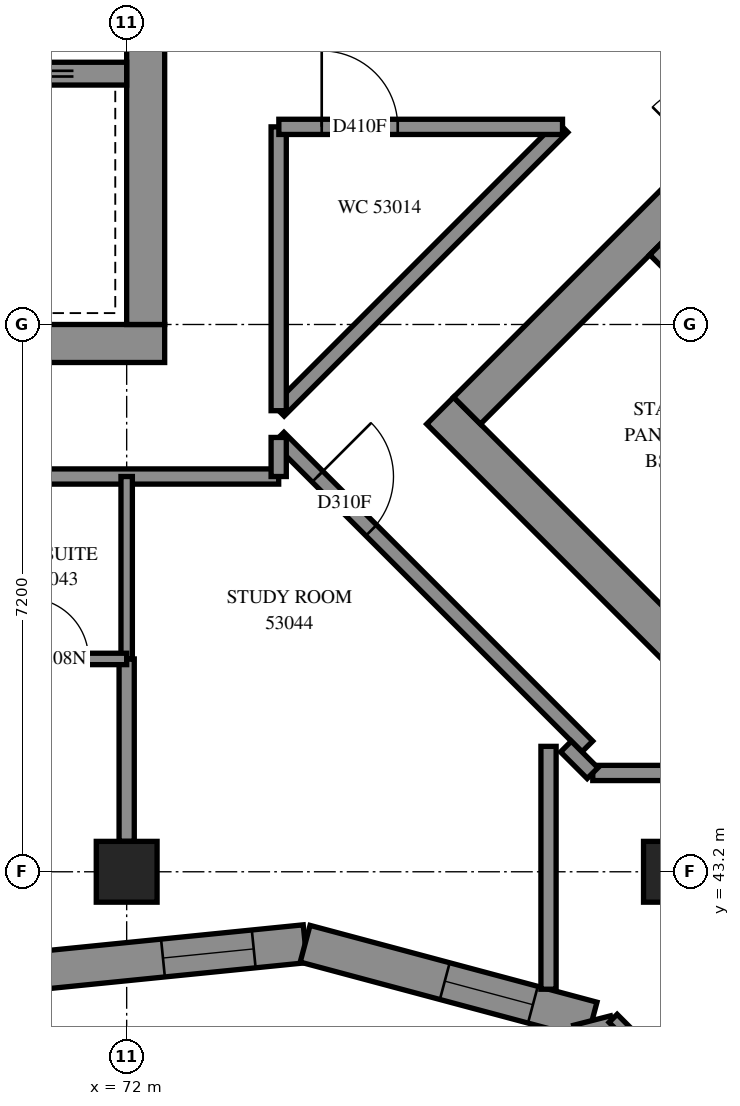
"""IFC4 building model, lengths in metres.
Left out: names, types, materials, properties, quantities, classifications, styles, units other than length and angle.
Written with IfcOpenShell. Run it as: python <this file> out.ifc"""

import sys

from ifc_helpers import new_model, si_unit, direction, frame, frame_2d, origin, origin_2d, place, context, subcontext, project, spatial, polyline, rectangle, outline, extrude, element, fill, save


model = new_model("IFC4")
c1 = context("Model", 3, precision=1e-05, world=origin(), true_north=direction((0.0, 1.0)))
c2 = subcontext(c1, "Body", "Model", "MODEL_VIEW")
j1 = project(units=[si_unit("LENGTHUNIT", "METRE"), si_unit("PLANEANGLEUNIT", "RADIAN")], contexts=[c1])
p1 = place(None, origin())
s1 = spatial("IfcSite", under=j1, at=p1, CompositionType="ELEMENT")
p2 = place(p1, origin())
s2 = spatial("IfcBuilding", under=s1, at=p2, CompositionType="ELEMENT")
p3 = place(p2, frame((0.0, 0.0, 196.4)))
s3 = spatial("IfcBuildingStorey", under=s2, at=p3, CompositionType="ELEMENT", Elevation=196.4)
for number, where, z_axis, x_axis in (
    (1, (72.0, 43.2, 0.0), (0.0, 0.0, 1.0), (1.0, 0.0, 0.0)),
    (2, (79.2, 43.2, 0.0), (0.0, 0.0, 1.0), (1.0, 0.0, 0.0)),
):
    element("IfcColumn", number, at=place(p3, frame(where, z_axis=z_axis, x_axis=x_axis)), inside=s3, PredefinedType="COLUMN", context=c2, shape_type="SweptSolid", body=[
        extrude(rectangle(XDim=0.8, YDim=0.8, at=origin_2d()), origin(), (0.0, 0.0, 1.0), 3.1),
    ])
p4 = place(p3, frame((57.1, 50.15, -0.3), z_axis=(0.0, 0.0, 1.0), x_axis=(1.0, 0.0, 0.0)))
e3 = element("IfcWall", 3, at=p4, inside=s3, PredefinedType="SHEAR", context=c2, shape_type="SweptSolid", body=[
    extrude(rectangle(XDim=15.4, YDim=0.5, at=frame_2d((7.7, 0.0))), origin(), (0.0, 0.0, 1.0), 2.7),
])
p5 = place(p3, frame((72.25, 50.4, -0.3), z_axis=(0.0, 0.0, 1.0), x_axis=(0.0, 1.0, 0.0)))
e4 = element("IfcWall", 4, at=p5, inside=s3, PredefinedType="SHEAR", context=c2, shape_type="SweptSolid", body=[
    extrude(rectangle(XDim=14.4, YDim=0.5, at=frame_2d((7.2, 0.0))), origin(), (0.0, 0.0, 1.0), 2.7),
])
p6 = place(p5, frame((4.55, 0.0, 0.3)))
e5 = element("IfcOpeningElement", 5, at=p6, cuts=e4, PredefinedType="OPENING", context=c2, shape_type="SweptSolid", body=[
    extrude(rectangle(XDim=1.1, YDim=2.1, at=frame_2d((0.55, 1.05))), frame((0.0, 0.26, 0.0), z_axis=(0.0, -1.0, 0.0), x_axis=(1.0, 0.0, 0.0)), (0.0, 0.0, 1.0), 0.52),
])
p7 = place(p5, frame((11.35, 0.0, 0.3)))
e6 = element("IfcOpeningElement", 6, at=p7, cuts=e4, PredefinedType="OPENING", context=c2, shape_type="SweptSolid", body=[
    extrude(rectangle(XDim=1.1, YDim=2.1, at=frame_2d((0.55, 1.05))), frame((0.0, 0.26, 0.0), z_axis=(0.0, -1.0, 0.0), x_axis=(1.0, 0.0, 0.0)), (0.0, 0.0, 1.0), 0.52),
])
p8 = place(p3, frame((57.6, 53.7, 0.0), z_axis=(0.0, 0.0, 1.0), x_axis=(1.0, 0.0, 0.0)))
e7 = element("IfcWall", 7, at=p8, inside=s3, PredefinedType="SOLIDWALL", context=c2, shape_type="SweptSolid", body=[
    extrude(rectangle(XDim=14.4, YDim=0.3, at=frame_2d((7.2, 0.0))), origin(), (0.0, 0.0, 1.0), 3.1),
])
p9 = place(p8, frame((1.35, 0.0, 0.0)))
e8 = element("IfcOpeningElement", 8, at=p9, cuts=e7, PredefinedType="OPENING", context=c2, shape_type="SweptSolid", body=[
    extrude(rectangle(XDim=0.9, YDim=2.1, at=frame_2d((0.45, 1.05))), frame((0.0, 0.16, 0.0), z_axis=(0.0, -1.0, 0.0), x_axis=(1.0, 0.0, 0.0)), (0.0, 0.0, 1.0), 0.32),
])
p10 = place(p8, frame((4.95, 0.0, 0.0)))
e9 = element("IfcOpeningElement", 9, at=p10, cuts=e7, PredefinedType="OPENING", context=c2, shape_type="SweptSolid", body=[
    extrude(rectangle(XDim=0.9, YDim=2.1, at=frame_2d((0.45, 1.05))), frame((0.0, 0.16, 0.0), z_axis=(0.0, -1.0, 0.0), x_axis=(1.0, 0.0, 0.0)), (0.0, 0.0, 1.0), 0.32),
])
p11 = place(p8, frame((8.55, 0.0, 0.0)))
e10 = element("IfcOpeningElement", 10, at=p11, cuts=e7, PredefinedType="OPENING", context=c2, shape_type="SweptSolid", body=[
    extrude(rectangle(XDim=0.9, YDim=2.1, at=frame_2d((0.45, 1.05))), frame((0.0, 0.16, 0.0), z_axis=(0.0, -1.0, 0.0), x_axis=(1.0, 0.0, 0.0)), (0.0, 0.0, 1.0), 0.32),
])
p12 = place(p8, frame((12.05, 0.0, 0.0)))
e11 = element("IfcOpeningElement", 11, at=p12, cuts=e7, PredefinedType="OPENING", context=c2, shape_type="SweptSolid", body=[
    extrude(rectangle(XDim=1.1, YDim=2.1, at=frame_2d((0.55, 1.05))), frame((0.0, 0.16, 0.0), z_axis=(0.0, -1.0, 0.0), x_axis=(1.0, 0.0, 0.0)), (0.0, 0.0, 1.0), 0.32),
])
p13 = place(p3, frame((76.124, 49.267, -0.3), z_axis=(0.0, 0.0, 1.0), x_axis=(0.7071067812, -0.7071067812, 0.0)))
e12 = element("IfcWall", 12, at=p13, inside=s3, PredefinedType="SHEAR", context=c2, shape_type="SweptSolid", body=[
    extrude(rectangle(XDim=15.4, YDim=0.5, at=frame_2d((7.7, 0.0))), origin(), (0.0, 0.0, 1.0), 2.7),
])
p14 = place(p3, frame((76.478, 49.267, -0.3), z_axis=(0.0, 0.0, 1.0), x_axis=(0.7071067812, 0.7071067812, 0.0)))
e13 = element("IfcWall", 13, at=p14, inside=s3, PredefinedType="SHEAR", context=c2, shape_type="SweptSolid", body=[
    extrude(rectangle(XDim=14.4, YDim=0.5, at=frame_2d((7.2, 0.0))), origin(), (0.0, 0.0, 1.0), 2.7),
])
p15 = place(p14, frame((4.55, 0.0, 0.3)))
e14 = element("IfcOpeningElement", 14, at=p15, cuts=e13, PredefinedType="OPENING", context=c2, shape_type="SweptSolid", body=[
    extrude(rectangle(XDim=1.1, YDim=2.1, at=frame_2d((0.55, 1.05))), frame((0.0, 0.26, 0.0), z_axis=(0.0, -1.0, 0.0), x_axis=(1.0, 0.0, 0.0)), (0.0, 0.0, 1.0), 0.52),
])
p16 = place(p14, frame((11.35, 0.0, 0.3)))
e15 = element("IfcOpeningElement", 15, at=p16, cuts=e13, PredefinedType="OPENING", context=c2, shape_type="SweptSolid", body=[
    extrude(rectangle(XDim=1.1, YDim=2.1, at=frame_2d((0.55, 1.05))), frame((0.0, 0.26, 0.0), z_axis=(0.0, -1.0, 0.0), x_axis=(1.0, 0.0, 0.0)), (0.0, 0.0, 1.0), 0.52),
])
p17 = place(p3, frame((78.988, 51.423, 0.0), z_axis=(0.0, 0.0, 1.0), x_axis=(0.7071067812, -0.7071067812, 0.0)))
e16 = element("IfcWall", 16, at=p17, inside=s3, PredefinedType="SOLIDWALL", context=c2, shape_type="SweptSolid", body=[
    extrude(rectangle(XDim=14.4, YDim=0.3, at=frame_2d((7.2, 0.0))), origin(), (0.0, 0.0, 1.0), 3.1),
])
p18 = place(p17, frame((1.35, 0.0, 0.0)))
e17 = element("IfcOpeningElement", 17, at=p18, cuts=e16, PredefinedType="OPENING", context=c2, shape_type="SweptSolid", body=[
    extrude(rectangle(XDim=0.9, YDim=2.1, at=frame_2d((0.45, 1.05))), frame((0.0, 0.16, 0.0), z_axis=(0.0, -1.0, 0.0), x_axis=(1.0, 0.0, 0.0)), (0.0, 0.0, 1.0), 0.32),
])
p19 = place(p17, frame((4.95, 0.0, 0.0)))
e18 = element("IfcOpeningElement", 18, at=p19, cuts=e16, PredefinedType="OPENING", context=c2, shape_type="SweptSolid", body=[
    extrude(rectangle(XDim=0.9, YDim=2.1, at=frame_2d((0.45, 1.05))), frame((0.0, 0.16, 0.0), z_axis=(0.0, -1.0, 0.0), x_axis=(1.0, 0.0, 0.0)), (0.0, 0.0, 1.0), 0.32),
])
p20 = place(p17, frame((8.55, 0.0, 0.0)))
e19 = element("IfcOpeningElement", 19, at=p20, cuts=e16, PredefinedType="OPENING", context=c2, shape_type="SweptSolid", body=[
    extrude(rectangle(XDim=0.9, YDim=2.1, at=frame_2d((0.45, 1.05))), frame((0.0, 0.16, 0.0), z_axis=(0.0, -1.0, 0.0), x_axis=(1.0, 0.0, 0.0)), (0.0, 0.0, 1.0), 0.32),
])
p21 = place(p17, frame((12.05, 0.0, 0.0)))
e20 = element("IfcOpeningElement", 20, at=p21, cuts=e16, PredefinedType="OPENING", context=c2, shape_type="SweptSolid", body=[
    extrude(rectangle(XDim=1.1, YDim=2.1, at=frame_2d((0.55, 1.05))), frame((0.0, 0.16, 0.0), z_axis=(0.0, -1.0, 0.0), x_axis=(1.0, 0.0, 0.0)), (0.0, 0.0, 1.0), 0.32),
])
p22 = place(p3, frame((70.738, 41.89, 0.0), z_axis=(0.0, 0.0, 1.0), x_axis=(0.9949827385, 0.1000467394, 0.0)))
e21 = element("IfcWall", 21, at=p22, inside=s3, PredefinedType="SOLIDWALL", context=c2, shape_type="SweptSolid", body=[
    extrude(outline(polyline([(-0.025, -0.25), (3.583, -0.25), (3.674, 0.25), (0.025, 0.25), (-0.025, -0.25)])), origin(), (0.0, 0.0, 1.0), 3.1),
])
p23 = place(p22, frame((1.748, 0.0, 0.45)))
e22 = element("IfcOpeningElement", 22, at=p23, cuts=e21, PredefinedType="OPENING", context=c2, shape_type="SweptSolid", body=[
    extrude(rectangle(XDim=1.2, YDim=2.5, at=frame_2d((0.6, 1.25))), frame((0.0, 0.26, 0.0), z_axis=(0.0, -1.0, 0.0), x_axis=(1.0, 0.0, 0.0)), (0.0, 0.0, 1.0), 0.52),
])
p24 = place(p3, frame((74.348, 42.253, 0.0), z_axis=(0.0, 0.0, 1.0), x_axis=(0.9659839018, -0.2586022069, 0.0)))
e23 = element("IfcWall", 23, at=p24, inside=s3, PredefinedType="SOLIDWALL", context=c2, shape_type="SweptSolid", body=[
    extrude(outline(polyline([(0.046, -0.25), (3.762, -0.25), (4.054, 0.25), (-0.046, 0.25), (0.046, -0.25)])), origin(), (0.0, 0.0, 1.0), 3.1),
])
p25 = place(p24, frame((1.902, 0.0, 0.45)))
e24 = element("IfcOpeningElement", 24, at=p25, cuts=e23, PredefinedType="OPENING", context=c2, shape_type="SweptSolid", body=[
    extrude(rectangle(XDim=1.2, YDim=2.5, at=frame_2d((0.6, 1.25))), frame((0.0, 0.26, 0.0), z_axis=(0.0, -1.0, 0.0), x_axis=(1.0, 0.0, 0.0)), (0.0, 0.0, 1.0), 0.52),
])
p26 = place(p3, frame((78.123, 41.243, 0.0), z_axis=(0.0, 0.0, 1.0), x_axis=(0.2482151311, -0.9687049338, 0.0)))
e25 = element("IfcWall", 25, at=p26, inside=s3, PredefinedType="SOLIDWALL", context=c2, shape_type="SweptSolid", body=[
    extrude(outline(polyline([(0.146, -0.25), (4.857, -0.25), (4.574, 0.25), (-0.146, 0.25), (0.146, -0.25)])), origin(), (0.0, 0.0, 1.0), 3.1),
])
p27 = place(p26, frame((2.135, 0.0, 0.45)))
e26 = element("IfcOpeningElement", 26, at=p27, cuts=e25, PredefinedType="OPENING", context=c2, shape_type="SweptSolid", body=[
    extrude(rectangle(XDim=1.2, YDim=2.5, at=frame_2d((0.6, 1.25))), frame((0.0, 0.26, 0.0), z_axis=(0.0, -1.0, 0.0), x_axis=(1.0, 0.0, 0.0)), (0.0, 0.0, 1.0), 0.52),
])
p28 = place(p26, frame((0.305, 0.0, 0.45)))
e27 = element("IfcOpeningElement", 27, at=p28, cuts=e25, PredefinedType="OPENING", context=c2, shape_type="SweptSolid", body=[
    extrude(rectangle(XDim=0.8, YDim=2.5, at=frame_2d((0.4, 1.25))), frame((0.0, 0.26, 0.0), z_axis=(0.0, -1.0, 0.0), x_axis=(1.0, 0.0, 0.0)), (0.0, 0.0, 1.0), 0.52),
])
p29 = place(p3, frame((55.6, 48.4, 0.0), z_axis=(0.0, 0.0, 1.0), x_axis=(1.0, 0.0, 0.0)))
e28 = element("IfcWall", 28, at=p29, inside=s3, PredefinedType="PARTITIONING", context=c2, shape_type="SweptSolid", body=[
    extrude(rectangle(XDim=18.4, YDim=0.2, at=frame_2d((9.2, 0.0))), origin(), (0.0, 0.0, 1.0), 3.1),
])
p30 = place(p29, frame((5.862, 0.0, 0.0)))
e29 = element("IfcOpeningElement", 29, at=p30, cuts=e28, PredefinedType="OPENING", context=c2, shape_type="SweptSolid", body=[
    extrude(rectangle(XDim=1.0, YDim=2.1, at=frame_2d((0.5, 1.05))), frame((0.0, 0.11, 0.0), z_axis=(0.0, -1.0, 0.0), x_axis=(1.0, 0.0, 0.0)), (0.0, 0.0, 1.0), 0.22),
])
p31 = place(p29, frame((11.5, 0.0, 0.0)))
e30 = element("IfcOpeningElement", 30, at=p31, cuts=e28, PredefinedType="OPENING", context=c2, shape_type="SweptSolid", body=[
    extrude(rectangle(XDim=0.9, YDim=2.1, at=frame_2d((0.45, 1.05))), frame((0.0, 0.11, 0.0), z_axis=(0.0, -1.0, 0.0), x_axis=(1.0, 0.0, 0.0)), (0.0, 0.0, 1.0), 0.22),
])
p32 = place(p29, frame((13.2, 0.0, 0.0)))
e31 = element("IfcOpeningElement", 31, at=p32, cuts=e28, PredefinedType="OPENING", context=c2, shape_type="SweptSolid", body=[
    extrude(rectangle(XDim=0.9, YDim=2.1, at=frame_2d((0.45, 1.05))), frame((0.0, 0.11, 0.0), z_axis=(0.0, -1.0, 0.0), x_axis=(1.0, 0.0, 0.0)), (0.0, 0.0, 1.0), 0.22),
])
p33 = place(p3, frame((73.999, 48.911, 0.0), z_axis=(0.0, 0.0, 1.0), x_axis=(0.7071067812, -0.7071067812, 0.0)))
e32 = element("IfcWall", 32, at=p33, inside=s3, PredefinedType="PARTITIONING", context=c2, shape_type="SweptSolid", body=[
    extrude(rectangle(XDim=5.745, YDim=0.2, at=frame_2d((2.872, 0.0))), origin(), (0.0, 0.0, 1.0), 3.1),
])
p34 = place(p33, frame((0.724, 0.0, 0.0)))
e33 = element("IfcOpeningElement", 33, at=p34, cuts=e32, PredefinedType="OPENING", context=c2, shape_type="SweptSolid", body=[
    extrude(rectangle(XDim=1.0, YDim=2.1, at=frame_2d((0.5, 1.05))), frame((0.0, 0.11, 0.0), z_axis=(0.0, -1.0, 0.0), x_axis=(1.0, 0.0, 0.0)), (0.0, 0.0, 1.0), 0.22),
])
p35 = place(p3, frame((74.001, 49.267, 0.0), z_axis=(0.0, 0.0, 1.0), x_axis=(0.7071067812, 0.7071067812, 0.0)))
e34 = element("IfcWall", 34, at=p35, inside=s3, PredefinedType="PARTITIONING", context=c2, shape_type="SweptSolid", body=[
    extrude(rectangle(XDim=5.278, YDim=0.2, at=frame_2d((2.639, 0.0))), origin(), (0.0, 0.0, 1.0), 3.1),
])
p36 = place(p3, frame((74.0, 49.266, 0.0), z_axis=(0.0, 0.0, 1.0), x_axis=(0.0, 1.0, 0.0)))
e35 = element("IfcWall", 35, at=p36, inside=s3, PredefinedType="PARTITIONING", context=c2, shape_type="SweptSolid", body=[
    extrude(rectangle(XDim=3.734, YDim=0.2, at=frame_2d((1.867, 0.0))), origin(), (0.0, 0.0, 1.0), 3.1),
])
p37 = place(p3, frame((74.002, 53.0, 0.0), z_axis=(0.0, 0.0, 1.0), x_axis=(1.0, 0.0, 0.0)))
e36 = element("IfcWall", 36, at=p37, inside=s3, PredefinedType="PARTITIONING", context=c2, shape_type="SweptSolid", body=[
    extrude(rectangle(XDim=3.732, YDim=0.2, at=frame_2d((1.866, 0.0))), origin(), (0.0, 0.0, 1.0), 3.1),
])
p38 = place(p37, frame((0.564, 0.0, 0.0)))
e37 = element("IfcOpeningElement", 37, at=p38, cuts=e36, PredefinedType="OPENING", context=c2, shape_type="SweptSolid", body=[
    extrude(rectangle(XDim=1.0, YDim=2.1, at=frame_2d((0.5, 1.05))), frame((0.0, 0.11, 0.0), z_axis=(0.0, -1.0, 0.0), x_axis=(1.0, 0.0, 0.0)), (0.0, 0.0, 1.0), 0.22),
])
p39 = place(p3, frame((77.55, 41.655, 0.0), z_axis=(0.0, 0.0, 1.0), x_axis=(0.0, 1.0, 0.0)))
e38 = element("IfcWall", 38, at=p39, inside=s3, PredefinedType="PARTITIONING", context=c2, shape_type="SweptSolid", body=[
    extrude(rectangle(XDim=3.195, YDim=0.2, at=frame_2d((1.598, 0.0))), origin(), (0.0, 0.0, 1.0), 3.1),
])
p40 = place(p3, frame((78.4, 41.272, 0.0), z_axis=(0.0, 0.0, 1.0), x_axis=(0.7065959276, -0.707617266, 0.0)))
e39 = element("IfcWall", 39, at=p40, inside=s3, PredefinedType="PARTITIONING", context=c2, shape_type="SweptSolid", body=[
    extrude(rectangle(XDim=2.937, YDim=0.15, at=frame_2d((1.469, 0.0))), origin(), (0.0, 0.0, 1.0), 3.1),
])
p41 = place(p3, frame((72.0, 43.6, 0.0), z_axis=(0.0, 0.0, 1.0), x_axis=(0.0, 1.0, 0.0)))
e40 = element("IfcWall", 40, at=p41, inside=s3, PredefinedType="PARTITIONING", context=c2, shape_type="SweptSolid", body=[
    extrude(rectangle(XDim=2.4, YDim=0.2, at=frame_2d((1.2, 0.0))), origin(), (0.0, 0.0, 1.0), 3.1),
])
p42 = place(p3, frame((72.0, 46.0, 0.0), z_axis=(0.0, 0.0, 1.0), x_axis=(0.0, 1.0, 0.0)))
e41 = element("IfcWall", 41, at=p42, inside=s3, PredefinedType="PARTITIONING", context=c2, shape_type="SweptSolid", body=[
    extrude(rectangle(XDim=2.4, YDim=0.15, at=frame_2d((1.2, 0.0))), origin(), (0.0, 0.0, 1.0), 3.1),
])
p43 = place(p3, frame((78.132, 44.5, 0.0), z_axis=(0.0, 0.0, 1.0), x_axis=(1.0, 0.0, 0.0)))
e42 = element("IfcWall", 42, at=p43, inside=s3, PredefinedType="PARTITIONING", context=c2, shape_type="SweptSolid", body=[
    extrude(rectangle(XDim=2.292, YDim=0.2, at=frame_2d((1.146, 0.0))), origin(), (0.0, 0.0, 1.0), 3.1),
])
p44 = place(p3, frame((78.678, 40.084, 0.0), z_axis=(0.0, 0.0, 1.0), x_axis=(0.7070826828, 0.7071308787, 0.0)))
e43 = element("IfcWall", 43, at=p44, inside=s3, PredefinedType="PARTITIONING", context=c2, shape_type="SweptSolid", body=[
    extrude(rectangle(XDim=2.075, YDim=0.15, at=frame_2d((1.037, 0.0))), origin(), (0.0, 0.0, 1.0), 3.1),
])
p45 = place(p3, frame((70.1, 46.0, 0.0), z_axis=(0.0, 0.0, 1.0), x_axis=(1.0, 0.0, 0.0)))
e44 = element("IfcWall", 44, at=p45, inside=s3, PredefinedType="PARTITIONING", context=c2, shape_type="SweptSolid", body=[
    extrude(rectangle(XDim=1.9, YDim=0.15, at=frame_2d((0.95, 0.0))), origin(), (0.0, 0.0, 1.0), 3.1),
])
p46 = place(p45, frame((0.598, 0.0, 0.0)))
e45 = element("IfcOpeningElement", 45, at=p46, cuts=e44, PredefinedType="OPENING", context=c2, shape_type="SweptSolid", body=[
    extrude(rectangle(XDim=0.8, YDim=2.1, at=frame_2d((0.4, 1.05))), frame((0.0, 0.085, 0.0), z_axis=(0.0, -1.0, 0.0), x_axis=(1.0, 0.0, 0.0)), (0.0, 0.0, 1.0), 0.17),
])
p47 = place(p3, frame((74.0, 48.4, 0.0), z_axis=(0.0, 0.0, 1.0), x_axis=(0.0, 1.0, 0.0)))
e46 = element("IfcWall", 46, at=p47, inside=s3, PredefinedType="PARTITIONING", context=c2, shape_type="SweptSolid", body=[
    extrude(rectangle(XDim=0.514, YDim=0.2, at=frame_2d((0.257, 0.0))), origin(), (0.0, 0.0, 1.0), 3.1),
])
p48 = place(p3, frame((77.779, 44.847, 0.0), z_axis=(0.0, 0.0, 1.0), x_axis=(0.7071067812, -0.7071067812, 0.0)))
e47 = element("IfcWall", 47, at=p48, inside=s3, PredefinedType="PARTITIONING", context=c2, shape_type="SweptSolid", body=[
    extrude(rectangle(XDim=0.495, YDim=0.2, at=frame_2d((0.247, 0.0))), origin(), (0.0, 0.0, 1.0), 3.1),
])
p49 = place(p23, origin())
e48 = element("IfcWindow", 48, at=p49, inside=s3, PartitioningType="SINGLE_PANEL", PredefinedType="WINDOW", context=c2, shape_type="SweptSolid", body=[
    extrude(rectangle(XDim=1.2, YDim=2.5, at=frame_2d((0.6, 1.25))), frame((0.0, 0.18, 0.0), z_axis=(0.0, -1.0, 0.0), x_axis=(1.0, 0.0, 0.0)), (0.0, 0.0, 1.0), 0.06),
])
fill(e22, e48)
p50 = place(p25, origin())
e49 = element("IfcWindow", 49, at=p50, inside=s3, PartitioningType="SINGLE_PANEL", PredefinedType="WINDOW", context=c2, shape_type="SweptSolid", body=[
    extrude(rectangle(XDim=1.2, YDim=2.5, at=frame_2d((0.6, 1.25))), frame((0.0, 0.18, 0.0), z_axis=(0.0, -1.0, 0.0), x_axis=(1.0, 0.0, 0.0)), (0.0, 0.0, 1.0), 0.06),
])
fill(e24, e49)
p51 = place(p38, origin())
e50 = element("IfcDoor", 50, at=p51, inside=s3, OperationType="SINGLE_SWING_RIGHT", PredefinedType="DOOR", context=c2, shape_type="SweptSolid", body=[
    extrude(rectangle(XDim=1.0, YDim=2.1, at=frame_2d((0.5, 1.05))), frame((0.0, 0.025, 0.0), z_axis=(0.0, -1.0, 0.0), x_axis=(1.0, 0.0, 0.0)), (0.0, 0.0, 1.0), 0.05),
])
fill(e37, e50)
p52 = place(p46, origin())
e51 = element("IfcDoor", 51, at=p52, inside=s3, OperationType="SINGLE_SWING_RIGHT", PredefinedType="DOOR", context=c2, shape_type="SweptSolid", body=[
    extrude(rectangle(XDim=0.8, YDim=2.1, at=frame_2d((0.4, 1.05))), frame((0.0, 0.025, 0.0), z_axis=(0.0, -1.0, 0.0), x_axis=(1.0, 0.0, 0.0)), (0.0, 0.0, 1.0), 0.05),
])
fill(e45, e51)
p53 = place(p34, origin())
e52 = element("IfcDoor", 52, at=p53, inside=s3, OperationType="SINGLE_SWING_LEFT", PredefinedType="DOOR", context=c2, shape_type="SweptSolid", body=[
    extrude(rectangle(XDim=1.0, YDim=2.1, at=frame_2d((0.5, 1.05))), frame((0.0, 0.025, 0.0), z_axis=(0.0, -1.0, 0.0), x_axis=(1.0, 0.0, 0.0)), (0.0, 0.0, 1.0), 0.05),
])
fill(e33, e52)
save(model, sys.argv[1])
